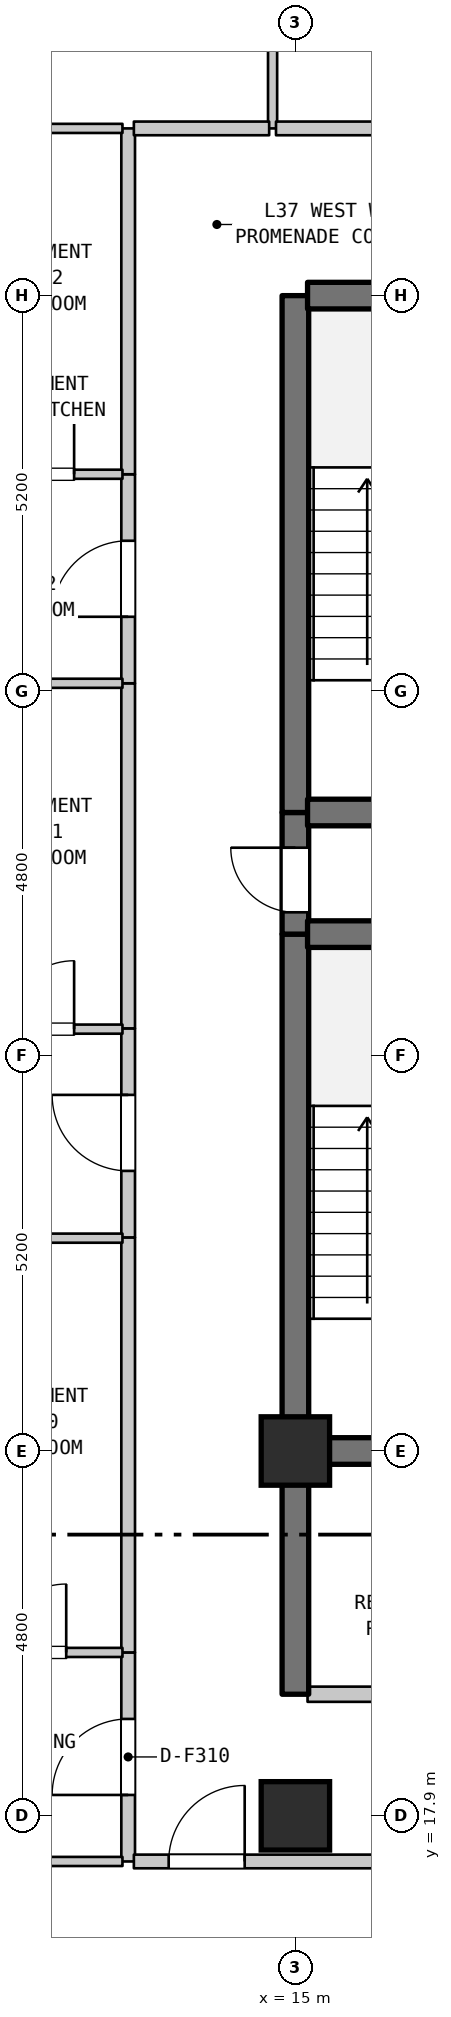
"""IFC4 building model, lengths in metres.
Left out: names, types, materials, properties, quantities, classifications, styles, units other than length and angle.
Written with IfcOpenShell. Run it as: python <this file> out.ifc"""

import sys

from ifc_helpers import new_model, si_unit, direction, frame, frame_2d, origin, origin_2d, place, context, subcontext, project, spatial, rectangle, extrude, element, fill, save


model = new_model("IFC4")
c1 = context("Model", 3, precision=1e-05, world=origin(), true_north=direction((0.0, 1.0)))
c2 = subcontext(c1, "Body", "Model", "MODEL_VIEW")
j1 = project(units=[si_unit("LENGTHUNIT", "METRE"), si_unit("PLANEANGLEUNIT", "RADIAN")], contexts=[c1])
p1 = place(None, origin())
s1 = spatial("IfcSite", under=j1, at=p1, CompositionType="ELEMENT")
p2 = place(p1, origin())
s2 = spatial("IfcBuilding", under=s1, at=p2, CompositionType="ELEMENT")
p3 = place(p2, frame((0.0, 0.0, 152.0)))
s3 = spatial("IfcBuildingStorey", under=s2, at=p3, CompositionType="ELEMENT", Elevation=152.0)
for number, where, z_axis, x_axis in (
    (1, (15.0, 17.9, 0.0), (0.0, 0.0, 1.0), (1.0, 0.0, 0.0)),
    (2, (15.0, 22.7, 0.0), (0.0, 0.0, 1.0), (1.0, 0.0, 0.0)),
):
    element("IfcColumn", number, at=place(p3, frame(where, z_axis=z_axis, x_axis=x_axis)), inside=s3, PredefinedType="COLUMN", context=c2, shape_type="SweptSolid", body=[
        extrude(rectangle(XDim=0.9, YDim=0.9, at=origin_2d()), origin(), (0.0, 0.0, 1.0), 3.7),
    ])
p4 = place(p3, frame((12.8, 17.3, 0.0), z_axis=(0.0, 0.0, 1.0), x_axis=(0.0, 1.0, 0.0)))
e3 = element("IfcWall", 3, at=p4, inside=s3, PredefinedType="STANDARD", context=c2, shape_type="SweptSolid", body=[
    extrude(rectangle(XDim=2.75, YDim=0.18, at=frame_2d((1.375, 0.0))), origin(), (0.0, 0.0, 1.0), 3.385),
])
p5 = place(p4, frame((0.875, 0.0, 0.0)))
e4 = element("IfcOpeningElement", 4, at=p5, cuts=e3, PredefinedType="OPENING", context=c2, shape_type="SweptSolid", body=[
    extrude(rectangle(XDim=1.0, YDim=2.15, at=frame_2d((0.5, 1.075))), frame((0.0, 0.1, 0.0), z_axis=(0.0, -1.0, 0.0), x_axis=(1.0, 0.0, 0.0)), (0.0, 0.0, 1.0), 0.2),
])
p6 = place(p3, frame((12.8, 20.05, 0.0), z_axis=(0.0, 0.0, 1.0), x_axis=(0.0, 1.0, 0.0)))
e5 = element("IfcWall", 5, at=p6, inside=s3, PredefinedType="STANDARD", context=c2, shape_type="SweptSolid", body=[
    extrude(rectangle(XDim=5.46, YDim=0.18, at=frame_2d((2.73, 0.0))), origin(), (0.0, 0.0, 1.0), 3.385),
])
p7 = place(p3, frame((12.8, 25.51, 0.0), z_axis=(0.0, 0.0, 1.0), x_axis=(0.0, 1.0, 0.0)))
e6 = element("IfcWall", 6, at=p7, inside=s3, PredefinedType="STANDARD", context=c2, shape_type="SweptSolid", body=[
    extrude(rectangle(XDim=2.75, YDim=0.18, at=frame_2d((1.375, 0.0))), origin(), (0.0, 0.0, 1.0), 3.385),
])
p8 = place(p7, frame((0.875, 0.0, 0.0)))
e7 = element("IfcOpeningElement", 7, at=p8, cuts=e6, PredefinedType="OPENING", context=c2, shape_type="SweptSolid", body=[
    extrude(rectangle(XDim=1.0, YDim=2.15, at=frame_2d((0.5, 1.075))), frame((0.0, 0.1, 0.0), z_axis=(0.0, -1.0, 0.0), x_axis=(1.0, 0.0, 0.0)), (0.0, 0.0, 1.0), 0.2),
])
p9 = place(p3, frame((12.8, 28.26, 0.0), z_axis=(0.0, 0.0, 1.0), x_axis=(0.0, 1.0, 0.0)))
e8 = element("IfcWall", 8, at=p9, inside=s3, PredefinedType="STANDARD", context=c2, shape_type="SweptSolid", body=[
    extrude(rectangle(XDim=4.54, YDim=0.18, at=frame_2d((2.27, 0.0))), origin(), (0.0, 0.0, 1.0), 3.385),
])
p10 = place(p3, frame((12.8, 32.8, 0.0), z_axis=(0.0, 0.0, 1.0), x_axis=(0.0, 1.0, 0.0)))
e9 = element("IfcWall", 9, at=p10, inside=s3, PredefinedType="STANDARD", context=c2, shape_type="SweptSolid", body=[
    extrude(rectangle(XDim=2.75, YDim=0.18, at=frame_2d((1.375, 0.0))), origin(), (0.0, 0.0, 1.0), 3.385),
])
p11 = place(p10, frame((0.875, 0.0, 0.0)))
e10 = element("IfcOpeningElement", 10, at=p11, cuts=e9, PredefinedType="OPENING", context=c2, shape_type="SweptSolid", body=[
    extrude(rectangle(XDim=1.0, YDim=2.15, at=frame_2d((0.5, 1.075))), frame((0.0, 0.1, 0.0), z_axis=(0.0, -1.0, 0.0), x_axis=(1.0, 0.0, 0.0)), (0.0, 0.0, 1.0), 0.2),
])
p12 = place(p3, frame((12.8, 35.55, 0.0), z_axis=(0.0, 0.0, 1.0), x_axis=(0.0, 1.0, 0.0)))
e11 = element("IfcWall", 11, at=p12, inside=s3, PredefinedType="STANDARD", context=c2, shape_type="SweptSolid", body=[
    extrude(rectangle(XDim=4.55, YDim=0.18, at=frame_2d((2.275, 0.0))), origin(), (0.0, 0.0, 1.0), 3.385),
])
p13 = place(p3, frame((14.7, 40.1, 0.0), z_axis=(0.0, 0.0, 1.0), x_axis=(0.0, 1.0, 0.0)))
e12 = element("IfcWall", 12, at=p13, inside=s3, PredefinedType="PARTITIONING", context=c2, shape_type="SweptSolid", body=[
    extrude(rectangle(XDim=3.2, YDim=0.12, at=frame_2d((1.6, 0.0))), origin(), (0.0, 0.0, 1.0), 3.385),
])
p14 = place(p13, frame((1.15, 0.0, 0.0)))
e13 = element("IfcOpeningElement", 13, at=p14, cuts=e12, PredefinedType="OPENING", context=c2, shape_type="SweptSolid", body=[
    extrude(rectangle(XDim=0.9, YDim=2.15, at=frame_2d((0.45, 1.075))), frame((0.0, 0.07, 0.0), z_axis=(0.0, -1.0, 0.0), x_axis=(1.0, 0.0, 0.0)), (0.0, 0.0, 1.0), 0.14),
])
p15 = place(p3, frame((15.0, 19.5, 0.0), z_axis=(0.0, 0.0, 1.0), x_axis=(0.0, 1.0, 0.0)))
e14 = element("IfcWall", 14, at=p15, inside=s3, PredefinedType="SHEAR", context=c2, shape_type="SweptSolid", body=[
    extrude(rectangle(XDim=3.2, YDim=0.35, at=frame_2d((1.6, 0.0))), origin(), (0.0, 0.0, 1.0), 3.385),
])
p16 = place(p3, frame((15.0, 22.7, 0.0), z_axis=(0.0, 0.0, 1.0), x_axis=(0.0, 1.0, 0.0)))
e15 = element("IfcWall", 15, at=p16, inside=s3, PredefinedType="SHEAR", context=c2, shape_type="SweptSolid", body=[
    extrude(rectangle(XDim=6.8, YDim=0.35, at=frame_2d((3.4, 0.0))), origin(), (0.0, 0.0, 1.0), 3.385),
])
p17 = place(p3, frame((15.0, 29.5, 0.0), z_axis=(0.0, 0.0, 1.0), x_axis=(0.0, 1.0, 0.0)))
e16 = element("IfcWall", 16, at=p17, inside=s3, PredefinedType="SHEAR", context=c2, shape_type="SweptSolid", body=[
    extrude(rectangle(XDim=1.6, YDim=0.35, at=frame_2d((0.8, 0.0))), origin(), (0.0, 0.0, 1.0), 3.385),
])
p18 = place(p17, frame((0.287, 0.0, 0.0)))
e17 = element("IfcOpeningElement", 17, at=p18, cuts=e16, PredefinedType="OPENING", context=c2, shape_type="SweptSolid", body=[
    extrude(rectangle(XDim=0.85, YDim=2.1, at=frame_2d((0.425, 1.05))), frame((0.0, 0.185, 0.0), z_axis=(0.0, -1.0, 0.0), x_axis=(1.0, 0.0, 0.0)), (0.0, 0.0, 1.0), 0.37),
])
p19 = place(p3, frame((15.0, 31.1, 0.0), z_axis=(0.0, 0.0, 1.0), x_axis=(0.0, 1.0, 0.0)))
e18 = element("IfcWall", 18, at=p19, inside=s3, PredefinedType="SHEAR", context=c2, shape_type="SweptSolid", body=[
    extrude(rectangle(XDim=6.8, YDim=0.35, at=frame_2d((3.4, 0.0))), origin(), (0.0, 0.0, 1.0), 3.385),
])
p20 = place(p3, frame((9.085, 17.3, 0.0), z_axis=(0.0, 0.0, 1.0), x_axis=(1.0, 0.0, 0.0)))
e19 = element("IfcWall", 19, at=p20, inside=s3, PredefinedType="PARTITIONING", context=c2, shape_type="SweptSolid", body=[
    extrude(rectangle(XDim=3.64, YDim=0.12, at=frame_2d((1.82, 0.0))), origin(), (0.0, 0.0, 1.0), 3.385),
])
p21 = place(p3, frame((12.875, 17.3, 0.0), z_axis=(0.0, 0.0, 1.0), x_axis=(1.0, 0.0, 0.0)))
e20 = element("IfcWall", 20, at=p21, inside=s3, PredefinedType="STANDARD", context=c2, shape_type="SweptSolid", body=[
    extrude(rectangle(XDim=3.78, YDim=0.18, at=frame_2d((1.89, 0.0))), origin(), (0.0, 0.0, 1.0), 3.385),
])
p22 = place(p21, frame((0.458, 0.0, 0.0)))
e21 = element("IfcOpeningElement", 21, at=p22, cuts=e20, PredefinedType="OPENING", context=c2, shape_type="SweptSolid", body=[
    extrude(rectangle(XDim=1.0, YDim=2.15, at=frame_2d((0.5, 1.075))), frame((0.0, 0.1, 0.0), z_axis=(0.0, -1.0, 0.0), x_axis=(1.0, 0.0, 0.0)), (0.0, 0.0, 1.0), 0.2),
])
p23 = place(p3, frame((15.16, 19.5, 0.0), z_axis=(0.0, 0.0, 1.0), x_axis=(1.0, 0.0, 0.0)))
e22 = element("IfcWall", 22, at=p23, inside=s3, PredefinedType="STANDARD", context=c2, shape_type="SweptSolid", body=[
    extrude(rectangle(XDim=3.68, YDim=0.2, at=frame_2d((1.84, 0.0))), origin(), (0.0, 0.0, 1.0), 3.385),
])
p24 = place(p23, frame((1.39, 0.0, 0.0)))
e23 = element("IfcOpeningElement", 23, at=p24, cuts=e22, PredefinedType="OPENING", context=c2, shape_type="SweptSolid", body=[
    extrude(rectangle(XDim=0.9, YDim=2.15, at=frame_2d((0.45, 1.075))), frame((0.0, 0.11, 0.0), z_axis=(0.0, -1.0, 0.0), x_axis=(1.0, 0.0, 0.0)), (0.0, 0.0, 1.0), 0.22),
])
p25 = place(p3, frame((10.456, 20.05, 0.0), z_axis=(0.0, 0.0, 1.0), x_axis=(1.0, 0.0, 0.0)))
e24 = element("IfcWall", 24, at=p25, inside=s3, PredefinedType="PARTITIONING", context=c2, shape_type="SweptSolid", body=[
    extrude(rectangle(XDim=2.269, YDim=0.12, at=frame_2d((1.135, 0.0))), origin(), (0.0, 0.0, 1.0), 3.385),
])
p26 = place(p25, frame((0.629, 0.0, 0.0)))
e25 = element("IfcOpeningElement", 25, at=p26, cuts=e24, PredefinedType="OPENING", context=c2, shape_type="SweptSolid", body=[
    extrude(rectangle(XDim=0.9, YDim=2.1, at=frame_2d((0.45, 1.05))), frame((0.0, 0.07, 0.0), z_axis=(0.0, -1.0, 0.0), x_axis=(1.0, 0.0, 0.0)), (0.0, 0.0, 1.0), 0.14),
])
p27 = place(p3, frame((15.16, 22.7, 0.0), z_axis=(0.0, 0.0, 1.0), x_axis=(1.0, 0.0, 0.0)))
e26 = element("IfcWall", 26, at=p27, inside=s3, PredefinedType="SHEAR", context=c2, shape_type="SweptSolid", body=[
    extrude(rectangle(XDim=3.68, YDim=0.35, at=frame_2d((1.84, 0.0))), origin(), (0.0, 0.0, 1.0), 3.385),
])
p28 = place(p3, frame((10.456, 25.5, 0.0), z_axis=(0.0, 0.0, 1.0), x_axis=(1.0, 0.0, 0.0)))
e27 = element("IfcWall", 27, at=p28, inside=s3, PredefinedType="PARTITIONING", context=c2, shape_type="SweptSolid", body=[
    extrude(rectangle(XDim=2.269, YDim=0.12, at=frame_2d((1.135, 0.0))), origin(), (0.0, 0.0, 1.0), 3.385),
])
p29 = place(p3, frame((10.523, 28.25, 0.0), z_axis=(0.0, 0.0, 1.0), x_axis=(1.0, 0.0, 0.0)))
e28 = element("IfcWall", 28, at=p29, inside=s3, PredefinedType="PARTITIONING", context=c2, shape_type="SweptSolid", body=[
    extrude(rectangle(XDim=2.202, YDim=0.12, at=frame_2d((1.101, 0.0))), origin(), (0.0, 0.0, 1.0), 3.385),
])
p30 = place(p29, frame((0.666, 0.0, 0.0)))
e29 = element("IfcOpeningElement", 29, at=p30, cuts=e28, PredefinedType="OPENING", context=c2, shape_type="SweptSolid", body=[
    extrude(rectangle(XDim=0.9, YDim=2.1, at=frame_2d((0.45, 1.05))), frame((0.0, 0.07, 0.0), z_axis=(0.0, -1.0, 0.0), x_axis=(1.0, 0.0, 0.0)), (0.0, 0.0, 1.0), 0.14),
])
for number, where, z_axis, x_axis in (
    (30, (15.16, 29.5, 0.0), (0.0, 0.0, 1.0), (1.0, 0.0, 0.0)),
    (31, (15.16, 31.1, 0.0), (0.0, 0.0, 1.0), (1.0, 0.0, 0.0)),
):
    element("IfcWall", number, at=place(p3, frame(where, z_axis=z_axis, x_axis=x_axis)), inside=s3, PredefinedType="SHEAR", context=c2, shape_type="SweptSolid", body=[
        extrude(rectangle(XDim=3.68, YDim=0.35, at=frame_2d((1.84, 0.0))), origin(), (0.0, 0.0, 1.0), 3.385),
    ])
p31 = place(p3, frame((10.523, 32.8, 0.0), z_axis=(0.0, 0.0, 1.0), x_axis=(1.0, 0.0, 0.0)))
e32 = element("IfcWall", 32, at=p31, inside=s3, PredefinedType="PARTITIONING", context=c2, shape_type="SweptSolid", body=[
    extrude(rectangle(XDim=2.202, YDim=0.12, at=frame_2d((1.101, 0.0))), origin(), (0.0, 0.0, 1.0), 3.385),
])
p32 = place(p3, frame((10.523, 35.55, 0.0), z_axis=(0.0, 0.0, 1.0), x_axis=(1.0, 0.0, 0.0)))
e33 = element("IfcWall", 33, at=p32, inside=s3, PredefinedType="PARTITIONING", context=c2, shape_type="SweptSolid", body=[
    extrude(rectangle(XDim=2.202, YDim=0.12, at=frame_2d((1.101, 0.0))), origin(), (0.0, 0.0, 1.0), 3.385),
])
p33 = place(p32, frame((0.666, 0.0, 0.0)))
e34 = element("IfcOpeningElement", 34, at=p33, cuts=e33, PredefinedType="OPENING", context=c2, shape_type="SweptSolid", body=[
    extrude(rectangle(XDim=0.9, YDim=2.1, at=frame_2d((0.45, 1.05))), frame((0.0, 0.07, 0.0), z_axis=(0.0, -1.0, 0.0), x_axis=(1.0, 0.0, 0.0)), (0.0, 0.0, 1.0), 0.14),
])
p34 = place(p3, frame((15.16, 37.9, 0.0), z_axis=(0.0, 0.0, 1.0), x_axis=(1.0, 0.0, 0.0)))
e35 = element("IfcWall", 35, at=p34, inside=s3, PredefinedType="SHEAR", context=c2, shape_type="SweptSolid", body=[
    extrude(rectangle(XDim=3.68, YDim=0.35, at=frame_2d((1.84, 0.0))), origin(), (0.0, 0.0, 1.0), 3.385),
])
p35 = place(p3, frame((10.523, 40.1, 0.0), z_axis=(0.0, 0.0, 1.0), x_axis=(1.0, 0.0, 0.0)))
e36 = element("IfcWall", 36, at=p35, inside=s3, PredefinedType="PARTITIONING", context=c2, shape_type="SweptSolid", body=[
    extrude(rectangle(XDim=2.202, YDim=0.12, at=frame_2d((1.101, 0.0))), origin(), (0.0, 0.0, 1.0), 3.385),
])
p36 = place(p3, frame((12.875, 40.1, 0.0), z_axis=(0.0, 0.0, 1.0), x_axis=(1.0, 0.0, 0.0)))
e37 = element("IfcWall", 37, at=p36, inside=s3, PredefinedType="STANDARD", context=c2, shape_type="SweptSolid", body=[
    extrude(rectangle(XDim=1.78, YDim=0.18, at=frame_2d((0.89, 0.0))), origin(), (0.0, 0.0, 1.0), 3.385),
])
p37 = place(p3, frame((14.745, 40.1, 0.0), z_axis=(0.0, 0.0, 1.0), x_axis=(1.0, 0.0, 0.0)))
e38 = element("IfcWall", 38, at=p37, inside=s3, PredefinedType="STANDARD", context=c2, shape_type="SweptSolid", body=[
    extrude(rectangle(XDim=2.26, YDim=0.18, at=frame_2d((1.13, 0.0))), origin(), (0.0, 0.0, 1.0), 3.385),
])
p38 = place(p5, origin())
e39 = element("IfcDoor", 39, at=p38, inside=s3, OperationType="SINGLE_SWING_LEFT", PredefinedType="DOOR", context=c2, shape_type="SweptSolid", body=[
    extrude(rectangle(XDim=1.0, YDim=2.15, at=frame_2d((0.5, 1.075))), frame((0.0, 0.025, 0.0), z_axis=(0.0, -1.0, 0.0), x_axis=(1.0, 0.0, 0.0)), (0.0, 0.0, 1.0), 0.05),
])
fill(e4, e39)
p39 = place(p8, origin())
e40 = element("IfcDoor", 40, at=p39, inside=s3, OperationType="SINGLE_SWING_RIGHT", PredefinedType="DOOR", context=c2, shape_type="SweptSolid", body=[
    extrude(rectangle(XDim=1.0, YDim=2.15, at=frame_2d((0.5, 1.075))), frame((0.0, 0.025, 0.0), z_axis=(0.0, -1.0, 0.0), x_axis=(1.0, 0.0, 0.0)), (0.0, 0.0, 1.0), 0.05),
])
fill(e7, e40)
p40 = place(p11, origin())
e41 = element("IfcDoor", 41, at=p40, inside=s3, OperationType="SINGLE_SWING_LEFT", PredefinedType="DOOR", context=c2, shape_type="SweptSolid", body=[
    extrude(rectangle(XDim=1.0, YDim=2.15, at=frame_2d((0.5, 1.075))), frame((0.0, 0.025, 0.0), z_axis=(0.0, -1.0, 0.0), x_axis=(1.0, 0.0, 0.0)), (0.0, 0.0, 1.0), 0.05),
])
fill(e10, e41)
p41 = place(p18, origin())
e42 = element("IfcDoor", 42, at=p41, inside=s3, OperationType="SINGLE_SWING_RIGHT", PredefinedType="DOOR", context=c2, shape_type="SweptSolid", body=[
    extrude(rectangle(XDim=0.85, YDim=2.1, at=frame_2d((0.425, 1.05))), frame((0.0, 0.025, 0.0), z_axis=(0.0, -1.0, 0.0), x_axis=(1.0, 0.0, 0.0)), (0.0, 0.0, 1.0), 0.05),
])
fill(e17, e42)
p42 = place(p22, origin())
e43 = element("IfcDoor", 43, at=p42, inside=s3, OperationType="SINGLE_SWING_RIGHT", PredefinedType="DOOR", context=c2, shape_type="SweptSolid", body=[
    extrude(rectangle(XDim=1.0, YDim=2.15, at=frame_2d((0.5, 1.075))), frame((0.0, 0.025, 0.0), z_axis=(0.0, -1.0, 0.0), x_axis=(1.0, 0.0, 0.0)), (0.0, 0.0, 1.0), 0.05),
])
fill(e21, e43)
p43 = place(p26, origin())
e44 = element("IfcDoor", 44, at=p43, inside=s3, OperationType="SINGLE_SWING_RIGHT", PredefinedType="DOOR", context=c2, shape_type="SweptSolid", body=[
    extrude(rectangle(XDim=0.9, YDim=2.1, at=frame_2d((0.45, 1.05))), frame((0.0, 0.025, 0.0), z_axis=(0.0, -1.0, 0.0), x_axis=(1.0, 0.0, 0.0)), (0.0, 0.0, 1.0), 0.05),
])
fill(e25, e44)
p44 = place(p30, origin())
e45 = element("IfcDoor", 45, at=p44, inside=s3, OperationType="SINGLE_SWING_RIGHT", PredefinedType="DOOR", context=c2, shape_type="SweptSolid", body=[
    extrude(rectangle(XDim=0.9, YDim=2.1, at=frame_2d((0.45, 1.05))), frame((0.0, 0.025, 0.0), z_axis=(0.0, -1.0, 0.0), x_axis=(1.0, 0.0, 0.0)), (0.0, 0.0, 1.0), 0.05),
])
fill(e29, e45)
p45 = place(p33, origin())
e46 = element("IfcDoor", 46, at=p45, inside=s3, OperationType="SINGLE_SWING_RIGHT", PredefinedType="DOOR", context=c2, shape_type="SweptSolid", body=[
    extrude(rectangle(XDim=0.9, YDim=2.1, at=frame_2d((0.45, 1.05))), frame((0.0, 0.025, 0.0), z_axis=(0.0, -1.0, 0.0), x_axis=(1.0, 0.0, 0.0)), (0.0, 0.0, 1.0), 0.05),
])
fill(e34, e46)
save(model, sys.argv[1])
